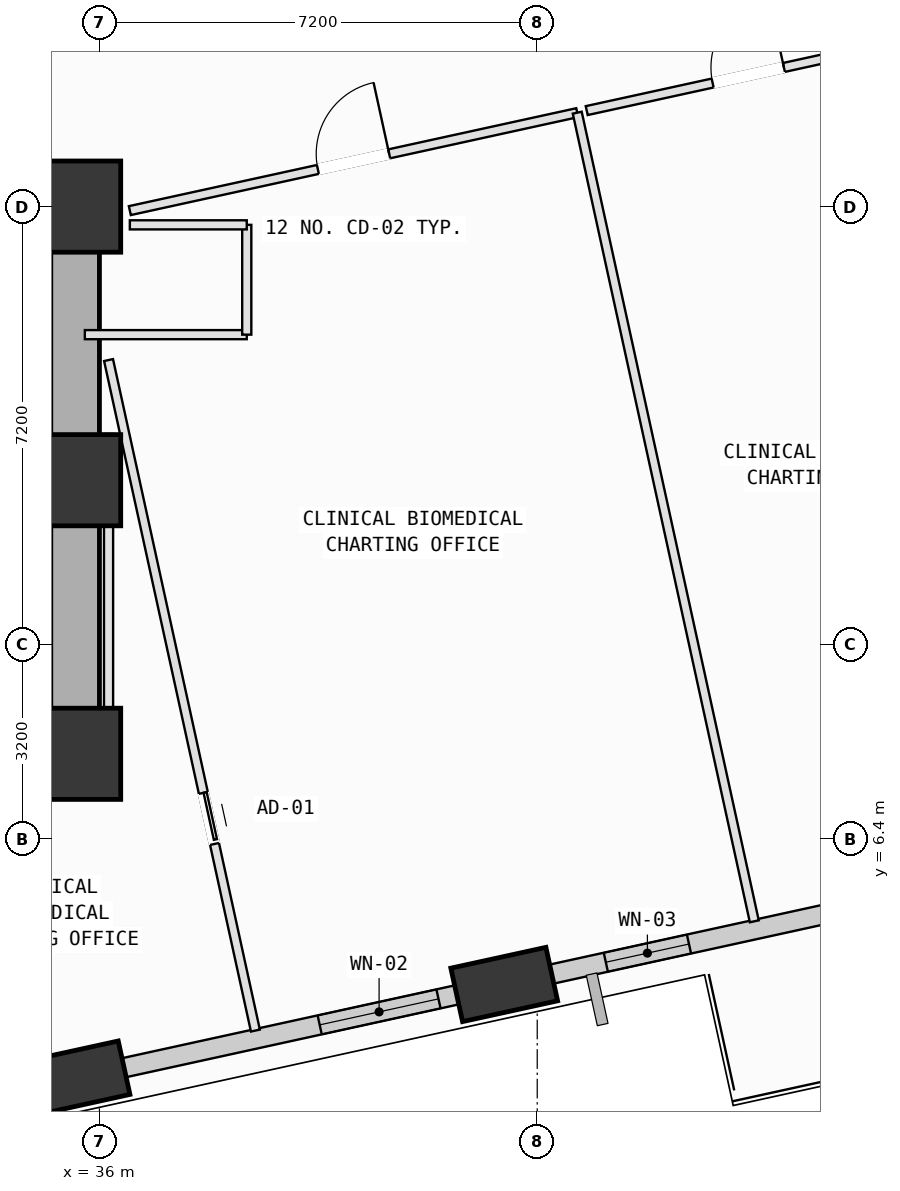
"""IFC4 building model, lengths in metres.
Left out: names, types, materials, properties, quantities, classifications, styles, units other than length and angle.
Written with IfcOpenShell. Run it as: python <this file> out.ifc"""

import sys

from ifc_helpers import new_model, si_unit, direction, frame, frame_2d, origin, origin_2d, place, context, subcontext, project, spatial, rectangle, extrude, element, fill, save


model = new_model("IFC4")
c1 = context("Model", 3, precision=1e-05, world=origin(), true_north=direction((0.0, 1.0)))
c2 = subcontext(c1, "Body", "Model", "MODEL_VIEW")
j1 = project(units=[si_unit("LENGTHUNIT", "METRE"), si_unit("PLANEANGLEUNIT", "RADIAN")], contexts=[c1])
p1 = place(None, origin())
s1 = spatial("IfcSite", under=j1, at=p1, CompositionType="ELEMENT")
p2 = place(p1, origin())
s2 = spatial("IfcBuilding", under=s1, at=p2, CompositionType="ELEMENT")
p3 = place(p2, frame((0.0, 0.0, 75.0)))
s3 = spatial("IfcBuildingStorey", under=s2, at=p3, CompositionType="ELEMENT", Elevation=75.0)
for number, where, z_axis, x_axis in (
    (1, (35.6, 7.8, 0.0), (0.0, 0.0, 1.0), (1.0, 0.0, 0.0)),
    (2, (35.6, 12.3, 0.0), (0.0, 0.0, 1.0), (1.0, 0.0, 0.0)),
    (3, (35.6, 16.8, 0.0), (0.0, 0.0, 1.0), (1.0, 0.0, 0.0)),
):
    element("IfcColumn", number, at=place(p3, frame(where, z_axis=z_axis, x_axis=x_axis)), inside=s3, PredefinedType="COLUMN", context=c2, shape_type="SweptSolid", body=[
        extrude(rectangle(XDim=1.5, YDim=1.5, at=origin_2d()), origin(), (0.0, 0.0, 1.0), 4.0),
    ])
p4 = place(p3, frame((35.624, 2.466, 0.002), z_axis=(0.092149700508, 0.009123732724, 0.995703364561), x_axis=(-0.308175869476, 0.951123215459, 0.019805617589)))
e4 = element("IfcColumn", 4, at=p4, inside=s3, PredefinedType="COLUMN", context=c2, shape_type="SweptSolid", body=[
    extrude(rectangle(XDim=1.6, YDim=0.9, at=origin_2d()), origin(), (0.0, 0.0, 1.0), 4.014),
])
p5 = place(p3, frame((42.657, 4.006, 0.002), z_axis=(0.085511723194, 0.038072787141, 0.995609465642), x_axis=(-0.591862434469, 0.805790321678, 0.020020393494)))
e5 = element("IfcColumn", 5, at=p5, inside=s3, PredefinedType="COLUMN", context=c2, shape_type="SweptSolid", body=[
    extrude(rectangle(XDim=1.6, YDim=0.9, at=origin_2d()), origin(), (0.0, 0.0, 1.0), 4.014),
])
p6 = place(p3, frame((35.211, 2.375, 0.0), z_axis=(0.0, 0.0, 1.0), x_axis=(-0.976862242803, -0.21386948961, 0.0)))
e6 = element("IfcWall", 6, at=p6, inside=s3, PredefinedType="SOLIDWALL", context=c2, shape_type="SweptSolid", body=[
    extrude(rectangle(XDim=5.99, YDim=0.32, at=frame_2d((2.995, 0.0))), origin(), (0.0, 0.0, 1.0), 3.165),
])
p7 = place(p6, frame((3.367, 0.0, 0.75)))
e7 = element("IfcOpeningElement", 7, at=p7, cuts=e6, PredefinedType="OPENING", context=c2, shape_type="SweptSolid", body=[
    extrude(rectangle(XDim=1.6, YDim=1.95, at=frame_2d((0.8, 0.975))), frame((0.0, 0.17, 0.0), z_axis=(0.0, -1.0, 0.0), x_axis=(1.0, 0.0, 0.0)), (0.0, 0.0, 1.0), 0.34),
])
p8 = place(p3, frame((42.244, 3.916, 0.0), z_axis=(0.0, 0.0, 1.0), x_axis=(-0.976864612663, -0.213858664838, 0.0)))
e8 = element("IfcWall", 8, at=p8, inside=s3, PredefinedType="SOLIDWALL", context=c2, shape_type="SweptSolid", body=[
    extrude(rectangle(XDim=5.985, YDim=0.32, at=frame_2d((2.993, 0.0))), origin(), (0.0, 0.0, 1.0), 3.165),
])
p9 = place(p8, frame((0.684, 0.0, 0.75)))
e9 = element("IfcOpeningElement", 9, at=p9, cuts=e8, PredefinedType="OPENING", context=c2, shape_type="SweptSolid", body=[
    extrude(rectangle(XDim=2.0, YDim=1.95, at=frame_2d((1.0, 0.975))), frame((0.0, 0.17, 0.0), z_axis=(0.0, -1.0, 0.0), x_axis=(1.0, 0.0, 0.0)), (0.0, 0.0, 1.0), 0.34),
])
p10 = place(p3, frame((49.284, 5.457, 0.0), z_axis=(0.0, 0.0, 1.0), x_axis=(-0.976859069831, -0.213883981842, 0.0)))
e10 = element("IfcWall", 10, at=p10, inside=s3, PredefinedType="SOLIDWALL", context=c2, shape_type="SweptSolid", body=[
    extrude(rectangle(XDim=5.993, YDim=0.32, at=frame_2d((2.996, 0.0))), origin(), (0.0, 0.0, 1.0), 3.165),
])
p11 = place(p10, frame((3.673, 0.0, 0.75)))
e11 = element("IfcOpeningElement", 11, at=p11, cuts=e10, PredefinedType="OPENING", context=c2, shape_type="SweptSolid", body=[
    extrude(rectangle(XDim=1.4, YDim=1.85, at=frame_2d((0.7, 0.925))), frame((0.0, 0.17, 0.0), z_axis=(0.0, -1.0, 0.0), x_axis=(1.0, 0.0, 0.0)), (0.0, 0.0, 1.0), 0.34),
])
p12 = place(p3, frame((24.8, 7.8, 0.0), z_axis=(0.0, 0.0, 1.0), x_axis=(1.0, 0.0, 0.0)))
e12 = element("IfcWall", 12, at=p12, inside=s3, PredefinedType="SHEAR", context=c2, shape_type="SweptSolid", body=[
    extrude(rectangle(XDim=10.8, YDim=0.8, at=frame_2d((5.4, 0.0))), origin(), (0.0, 0.0, 1.0), 3.78),
])
p13 = place(p3, frame((35.6, 7.8, 0.0), z_axis=(0.0, 0.0, 1.0), x_axis=(0.0, 1.0, 0.0)))
e13 = element("IfcWall", 13, at=p13, inside=s3, PredefinedType="SHEAR", context=c2, shape_type="SweptSolid", body=[
    extrude(rectangle(XDim=9.0, YDim=0.8, at=frame_2d((4.5, 0.0))), origin(), (0.0, 0.0, 1.0), 3.78),
])
p14 = place(p3, frame((36.15, 14.276, 0.0), z_axis=(0.0, 0.0, 1.0), x_axis=(0.213925186331, -0.976850047168, 0.0)))
e14 = element("IfcWall", 14, at=p14, inside=s3, PredefinedType="PARTITIONING", context=c2, shape_type="SweptSolid", body=[
    extrude(rectangle(XDim=11.289, YDim=0.15, at=frame_2d((5.645, 0.0))), origin(), (0.0, 0.0, 1.0), 3.78),
])
p15 = place(p14, frame((7.287, 0.0, 0.0)))
e15 = element("IfcOpeningElement", 15, at=p15, cuts=e14, PredefinedType="OPENING", context=c2, shape_type="SweptSolid", body=[
    extrude(rectangle(XDim=0.86, YDim=2.06, at=frame_2d((0.43, 1.03))), frame((0.0, 0.085, 0.0), z_axis=(0.0, -1.0, 0.0), x_axis=(1.0, 0.0, 0.0)), (0.0, 0.0, 1.0), 0.17),
])
p16 = place(p3, frame((36.447, 2.411, 0.0), z_axis=(0.0, 0.0, 1.0), x_axis=(-0.976839685848, -0.213972493918, 0.0)))
e16 = element("IfcWall", 16, at=p16, inside=s3, PredefinedType="PARTITIONING", context=c2, shape_type="SweptSolid", body=[
    extrude(rectangle(XDim=1.215, YDim=0.15, at=frame_2d((0.607, 0.0))), origin(), (0.0, 0.0, 1.0), 3.165),
])
p17 = place(p3, frame((36.15, 7.5, 0.0), z_axis=(0.0, 0.0, 1.0), x_axis=(0.0, 1.0, 0.0)))
e17 = element("IfcWall", 17, at=p17, inside=s3, PredefinedType="PARTITIONING", context=c2, shape_type="SweptSolid", body=[
    extrude(rectangle(XDim=5.561, YDim=0.15, at=frame_2d((2.781, 0.0))), origin(), (0.0, 0.0, 1.0), 3.78),
])
p18 = place(p3, frame((36.5, 16.734, 0.0), z_axis=(0.0, 0.0, 1.0), x_axis=(0.976857284262, 0.213892136799, 0.0)))
e18 = element("IfcWall", 18, at=p18, inside=s3, PredefinedType="PARTITIONING", context=c2, shape_type="SweptSolid", body=[
    extrude(rectangle(XDim=7.532, YDim=0.15, at=frame_2d((3.766, 0.0))), origin(), (0.0, 0.0, 1.0), 3.78),
])
p19 = place(p18, frame((3.166, 0.0, 0.0)))
e19 = element("IfcOpeningElement", 19, at=p19, cuts=e18, PredefinedType="OPENING", context=c2, shape_type="SweptSolid", body=[
    extrude(rectangle(XDim=1.2, YDim=2.15, at=frame_2d((0.6, 1.075))), frame((0.0, 0.085, 0.0), z_axis=(0.0, -1.0, 0.0), x_axis=(1.0, 0.0, 0.0)), (0.0, 0.0, 1.0), 0.17),
])
p20 = place(p3, frame((43.858, 18.345, 0.0), z_axis=(0.0, 0.0, 1.0), x_axis=(0.213887788309, -0.976858236395, 0.0)))
e20 = element("IfcWall", 20, at=p20, inside=s3, PredefinedType="PARTITIONING", context=c2, shape_type="SweptSolid", body=[
    extrude(rectangle(XDim=13.615, YDim=0.15, at=frame_2d((6.808, 0.0))), origin(), (0.0, 0.0, 1.0), 3.78),
])
p21 = place(p3, frame((43.479, 3.95, 0.0), z_axis=(0.0, 0.0, 1.0), x_axis=(-0.976970809845, -0.213372999021, 0.0)))
e21 = element("IfcWall", 21, at=p21, inside=s3, PredefinedType="PARTITIONING", context=c2, shape_type="SweptSolid", body=[
    extrude(rectangle(XDim=1.214, YDim=0.15, at=frame_2d((0.607, 0.0))), origin(), (0.0, 0.0, 1.0), 3.165),
])
p22 = place(p3, frame((35.76, 14.694, 0.0), z_axis=(0.0, 0.0, 1.0), x_axis=(1.0, 0.0, 0.0)))
e22 = element("IfcWall", 22, at=p22, inside=s3, PredefinedType="PARTITIONING", context=c2, shape_type="SweptSolid", body=[
    extrude(rectangle(XDim=2.663, YDim=0.15, at=frame_2d((1.332, 0.0))), origin(), (0.0, 0.0, 1.0), 3.78),
])
p23 = place(p3, frame((38.423, 14.694, 0.0), z_axis=(0.0, 0.0, 1.0), x_axis=(0.0, 1.0, 0.0)))
e23 = element("IfcWall", 23, at=p23, inside=s3, PredefinedType="PARTITIONING", context=c2, shape_type="SweptSolid", body=[
    extrude(rectangle(XDim=1.806, YDim=0.15, at=frame_2d((0.903, 0.0))), origin(), (0.0, 0.0, 1.0), 3.78),
])
p24 = place(p3, frame((38.423, 16.5, 0.0), z_axis=(0.0, 0.0, 1.0), x_axis=(-1.0, 0.0, 0.0)))
e24 = element("IfcWall", 24, at=p24, inside=s3, PredefinedType="PARTITIONING", context=c2, shape_type="SweptSolid", body=[
    extrude(rectangle(XDim=1.923, YDim=0.15, at=frame_2d((0.961, 0.0))), origin(), (0.0, 0.0, 1.0), 3.78),
])
p25 = place(p3, frame((44.014, 18.379, 0.0), z_axis=(0.0, 0.0, 1.0), x_axis=(0.976874830537, 0.213811986248, 0.0)))
e25 = element("IfcWall", 25, at=p25, inside=s3, PredefinedType="PARTITIONING", context=c2, shape_type="SweptSolid", body=[
    extrude(rectangle(XDim=5.44, YDim=0.15, at=frame_2d((2.72, 0.0))), origin(), (0.0, 0.0, 1.0), 3.78),
])
p26 = place(p25, frame((2.12, 0.0, 0.0)))
e26 = element("IfcOpeningElement", 26, at=p26, cuts=e25, PredefinedType="OPENING", context=c2, shape_type="SweptSolid", body=[
    extrude(rectangle(XDim=1.2, YDim=2.15, at=frame_2d((0.6, 1.075))), frame((0.0, 0.085, 0.0), z_axis=(0.0, -1.0, 0.0), x_axis=(1.0, 0.0, 0.0)), (0.0, 0.0, 1.0), 0.17),
])
p27 = place(p9, origin())
e27 = element("IfcWindow", 27, at=p27, inside=s3, PartitioningType="SINGLE_PANEL", PredefinedType="WINDOW", context=c2, shape_type="SweptSolid", body=[
    extrude(rectangle(XDim=2.0, YDim=1.95, at=frame_2d((1.0, 0.975))), frame((0.0, 0.03, 0.0), z_axis=(0.0, -1.0, 0.0), x_axis=(1.0, 0.0, 0.0)), (0.0, 0.0, 1.0), 0.06),
])
fill(e9, e27)
p28 = place(p11, origin())
e28 = element("IfcWindow", 28, at=p28, inside=s3, PartitioningType="SINGLE_PANEL", PredefinedType="WINDOW", context=c2, shape_type="SweptSolid", body=[
    extrude(rectangle(XDim=1.4, YDim=1.85, at=frame_2d((0.7, 0.925))), frame((0.0, 0.03, 0.0), z_axis=(0.0, -1.0, 0.0), x_axis=(1.0, 0.0, 0.0)), (0.0, 0.0, 1.0), 0.06),
])
fill(e11, e28)
p29 = place(p19, origin())
e29 = element("IfcDoor", 29, at=p29, inside=s3, OperationType="SINGLE_SWING_RIGHT", PredefinedType="DOOR", context=c2, shape_type="SweptSolid", body=[
    extrude(rectangle(XDim=1.2, YDim=2.15, at=frame_2d((0.6, 1.075))), frame((0.0, 0.025, 0.0), z_axis=(0.0, -1.0, 0.0), x_axis=(1.0, 0.0, 0.0)), (0.0, 0.0, 1.0), 0.05),
])
fill(e19, e29)
p30 = place(p26, origin())
e30 = element("IfcDoor", 30, at=p30, inside=s3, OperationType="SINGLE_SWING_RIGHT", PredefinedType="DOOR", context=c2, shape_type="SweptSolid", body=[
    extrude(rectangle(XDim=1.2, YDim=2.15, at=frame_2d((0.6, 1.075))), frame((0.0, 0.025, 0.0), z_axis=(0.0, -1.0, 0.0), x_axis=(1.0, 0.0, 0.0)), (0.0, 0.0, 1.0), 0.05),
])
fill(e26, e30)
p31 = place(p15, origin())
e31 = element("IfcDoor", 31, at=p31, inside=s3, OperationType="SLIDING_TO_LEFT", PredefinedType="DOOR", context=c2, shape_type="SweptSolid", body=[
    extrude(rectangle(XDim=0.86, YDim=2.06, at=frame_2d((0.43, 1.03))), frame((0.0, 0.025, 0.0), z_axis=(0.0, -1.0, 0.0), x_axis=(1.0, 0.0, 0.0)), (0.0, 0.0, 1.0), 0.05),
])
fill(e15, e31)
save(model, sys.argv[1])
